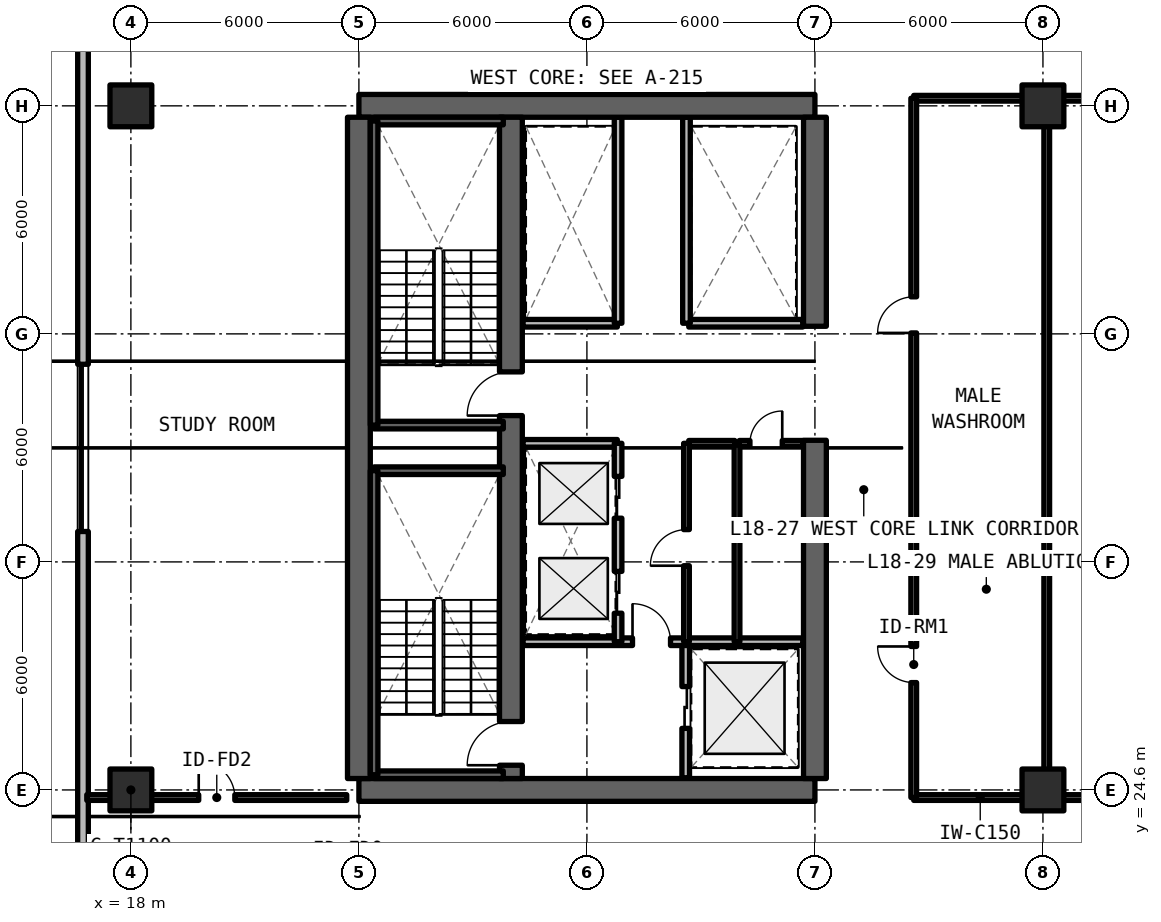
"""IFC4 building model, lengths in metres.
Left out: names, types, materials, properties, quantities, classifications, styles, units other than length and angle.
Written with IfcOpenShell. Run it as: python <this file> out.ifc"""

import sys

from ifc_helpers import new_model, si_unit, direction, frame, frame_2d, origin, origin_2d, place, context, subcontext, project, spatial, rectangle, extrude, element, fill, save


model = new_model("IFC4")
c1 = context("Model", 3, precision=1e-05, world=origin(), true_north=direction((0.0, 1.0)))
c2 = subcontext(c1, "Body", "Model", "MODEL_VIEW")
j1 = project(units=[si_unit("LENGTHUNIT", "METRE"), si_unit("PLANEANGLEUNIT", "RADIAN")], contexts=[c1])
p1 = place(None, origin())
s1 = spatial("IfcSite", under=j1, at=p1, CompositionType="ELEMENT")
p2 = place(p1, origin())
s2 = spatial("IfcBuilding", under=s1, at=p2, CompositionType="ELEMENT")
p3 = place(p2, frame((0.0, 0.0, 66.0)))
s3 = spatial("IfcBuildingStorey", under=s2, at=p3, CompositionType="ELEMENT", Elevation=66.0)
for number, where, z_axis, x_axis in (
    (1, (24.0, 24.6, 0.0), (0.0, 0.0, 1.0), (1.0, 0.0, 0.0)),
    (2, (36.0, 42.6, 0.0), (0.0, 0.0, 1.0), (-1.0, 0.0, 0.0)),
):
    element("IfcWall", number, at=place(p3, frame(where, z_axis=z_axis, x_axis=x_axis)), inside=s3, PredefinedType="SHEAR", context=c2, shape_type="SweptSolid", body=[
        extrude(rectangle(XDim=12.0, YDim=0.6, at=frame_2d((6.0, 0.0))), origin(), (0.0, 0.0, 1.0), 3.63),
    ])
p4 = place(p3, frame((24.0, 24.9, 0.0), z_axis=(0.0, 0.0, 1.0), x_axis=(0.0, 1.0, 0.0)))
e3 = element("IfcWall", 3, at=p4, inside=s3, PredefinedType="SHEAR", context=c2, shape_type="SweptSolid", body=[
    extrude(rectangle(XDim=17.4, YDim=0.6, at=frame_2d((8.7, 0.0))), origin(), (0.0, 0.0, 1.0), 3.63),
])
p5 = place(p3, frame((36.0, 24.9, 0.0), z_axis=(0.0, 0.0, 1.0), x_axis=(0.0, 1.0, 0.0)))
e4 = element("IfcWall", 4, at=p5, inside=s3, PredefinedType="SHEAR", context=c2, shape_type="SweptSolid", body=[
    extrude(rectangle(XDim=8.9, YDim=0.6, at=frame_2d((4.45, 0.0))), origin(), (0.0, 0.0, 1.0), 3.63),
])
p6 = place(p3, frame((36.0, 36.8, 0.0), z_axis=(0.0, 0.0, 1.0), x_axis=(0.0, 1.0, 0.0)))
e5 = element("IfcWall", 5, at=p6, inside=s3, PredefinedType="SHEAR", context=c2, shape_type="SweptSolid", body=[
    extrude(rectangle(XDim=5.5, YDim=0.6, at=frame_2d((2.75, 0.0))), origin(), (0.0, 0.0, 1.0), 3.63),
])
p7 = place(p3, frame((28.0, 24.9, 0.0), z_axis=(0.0, 0.0, 1.0), x_axis=(0.0, 1.0, 0.0)))
e6 = element("IfcWall", 6, at=p7, inside=s3, PredefinedType="SHEAR", context=c2, shape_type="SweptSolid", body=[
    extrude(rectangle(XDim=17.4, YDim=0.6, at=frame_2d((8.7, 0.0))), origin(), (0.0, 0.0, 1.0), 3.63),
])
p8 = place(p7, frame((0.35, 0.0, 0.0)))
e7 = element("IfcOpeningElement", 7, at=p8, cuts=e6, PredefinedType="OPENING", context=c2, shape_type="SweptSolid", body=[
    extrude(rectangle(XDim=1.15, YDim=2.15, at=frame_2d((0.575, 1.075))), frame((0.0, 0.31, 0.0), z_axis=(0.0, -1.0, 0.0), x_axis=(1.0, 0.0, 0.0)), (0.0, 0.0, 1.0), 0.62),
])
p9 = place(p7, frame((9.55, 0.0, 0.0)))
e8 = element("IfcOpeningElement", 8, at=p9, cuts=e6, PredefinedType="OPENING", context=c2, shape_type="SweptSolid", body=[
    extrude(rectangle(XDim=1.15, YDim=2.15, at=frame_2d((0.575, 1.075))), frame((0.0, 0.31, 0.0), z_axis=(0.0, -1.0, 0.0), x_axis=(1.0, 0.0, 0.0)), (0.0, 0.0, 1.0), 0.62),
])
for number, where, z_axis, x_axis in (
    (9, (18.0, 24.6, 0.0), (0.0, 0.0, 1.0), (1.0, 0.0, 0.0)),
    (10, (18.0, 42.6, 0.0), (0.0, 0.0, 1.0), (1.0, 0.0, 0.0)),
    (11, (42.0, 24.6, 0.0), (0.0, 0.0, 1.0), (1.0, 0.0, 0.0)),
    (12, (42.0, 42.6, 0.0), (0.0, 0.0, 1.0), (1.0, 0.0, 0.0)),
):
    element("IfcColumn", number, at=place(p3, frame(where, z_axis=z_axis, x_axis=x_axis)), inside=s3, PredefinedType="COLUMN", context=c2, shape_type="SweptSolid", body=[
        extrude(rectangle(XDim=1.1, YDim=1.1, at=origin_2d()), origin(), (0.0, 0.0, 1.0), 3.63),
    ])
p10 = place(p3, frame((16.74, 55.342, 0.0), z_axis=(0.0, 0.0, 1.0), x_axis=(0.0, -1.0, 0.0)))
e13 = element("IfcWall", 13, at=p10, inside=s3, PredefinedType="SOLIDWALL", context=c2, shape_type="SweptSolid", body=[
    extrude(rectangle(XDim=43.484, YDim=0.28, at=frame_2d((21.742, 0.0))), origin(), (0.0, 0.0, 1.0), 3.41),
])
p11 = place(p10, frame((38.942, 0.0, 0.0)))
e14 = element("IfcOpeningElement", 14, at=p11, cuts=e13, PredefinedType="OPENING", context=c2, shape_type="SweptSolid", body=[
    extrude(rectangle(XDim=1.1, YDim=2.15, at=frame_2d((0.55, 1.075))), frame((0.0, 0.15, 0.0), z_axis=(0.0, -1.0, 0.0), x_axis=(1.0, 0.0, 0.0)), (0.0, 0.0, 1.0), 0.3),
])
p12 = place(p10, frame((19.542, 0.0, 0.78)))
e15 = element("IfcOpeningElement", 15, at=p12, cuts=e13, PredefinedType="OPENING", context=c2, shape_type="SweptSolid", body=[
    extrude(rectangle(XDim=4.4, YDim=1.66, at=frame_2d((2.2, 0.83))), frame((0.0, 0.15, 0.0), z_axis=(0.0, -1.0, 0.0), x_axis=(1.0, 0.0, 0.0)), (0.0, 0.0, 1.0), 0.3),
])
p13 = place(p3, frame((32.6, 24.92, 0.0), z_axis=(0.0, 0.0, 1.0), x_axis=(0.0, 1.0, 0.0)))
e16 = element("IfcWall", 16, at=p13, inside=s3, PredefinedType="SOLIDWALL", context=c2, shape_type="SweptSolid", body=[
    extrude(rectangle(XDim=3.58, YDim=0.2, at=frame_2d((1.79, 0.0))), origin(), (0.0, 0.0, 1.0), 2.63),
])
p14 = place(p13, frame((1.3, 0.0, 0.0)))
e17 = element("IfcOpeningElement", 17, at=p14, cuts=e16, PredefinedType="OPENING", context=c2, shape_type="SweptSolid", body=[
    extrude(rectangle(XDim=1.1, YDim=2.2, at=frame_2d((0.55, 1.1))), frame((0.0, 0.11, 0.0), z_axis=(0.0, -1.0, 0.0), x_axis=(1.0, 0.0, 0.0)), (0.0, 0.0, 1.0), 0.22),
])
p15 = place(p3, frame((28.32, 28.5, 0.0), z_axis=(0.0, 0.0, 1.0), x_axis=(1.0, 0.0, 0.0)))
e18 = element("IfcWall", 18, at=p15, inside=s3, PredefinedType="SOLIDWALL", context=c2, shape_type="SweptSolid", body=[
    extrude(rectangle(XDim=7.36, YDim=0.2, at=frame_2d((3.68, 0.0))), origin(), (0.0, 0.0, 1.0), 2.63),
])
p16 = place(p15, frame((2.88, 0.0, 0.0)))
e19 = element("IfcOpeningElement", 19, at=p16, cuts=e18, PredefinedType="OPENING", context=c2, shape_type="SweptSolid", body=[
    extrude(rectangle(XDim=1.0, YDim=2.15, at=frame_2d((0.5, 1.075))), frame((0.0, 0.11, 0.0), z_axis=(0.0, -1.0, 0.0), x_axis=(1.0, 0.0, 0.0)), (0.0, 0.0, 1.0), 0.22),
])
p17 = place(p3, frame((28.32, 33.72, 0.0), z_axis=(0.0, 0.0, 1.0), x_axis=(1.0, 0.0, 0.0)))
e20 = element("IfcWall", 20, at=p17, inside=s3, PredefinedType="SOLIDWALL", context=c2, shape_type="SweptSolid", body=[
    extrude(rectangle(XDim=2.48, YDim=0.2, at=frame_2d((1.24, 0.0))), origin(), (0.0, 0.0, 1.0), 2.63),
])
p18 = place(p3, frame((30.82, 28.5, 0.0), z_axis=(0.0, 0.0, 1.0), x_axis=(0.0, 1.0, 0.0)))
e21 = element("IfcWall", 21, at=p18, inside=s3, PredefinedType="SOLIDWALL", context=c2, shape_type="SweptSolid", body=[
    extrude(rectangle(XDim=5.22, YDim=0.2, at=frame_2d((2.61, 0.0))), origin(), (0.0, 0.0, 1.0), 2.63),
])
p19 = place(p18, frame((0.75, 0.0, 0.0)))
e22 = element("IfcOpeningElement", 22, at=p19, cuts=e21, PredefinedType="OPENING", context=c2, shape_type="SweptSolid", body=[
    extrude(rectangle(XDim=1.1, YDim=2.2, at=frame_2d((0.55, 1.1))), frame((0.0, 0.11, 0.0), z_axis=(0.0, -1.0, 0.0), x_axis=(1.0, 0.0, 0.0)), (0.0, 0.0, 1.0), 0.22),
])
p20 = place(p18, frame((3.25, 0.0, 0.0)))
e23 = element("IfcOpeningElement", 23, at=p20, cuts=e21, PredefinedType="OPENING", context=c2, shape_type="SweptSolid", body=[
    extrude(rectangle(XDim=1.1, YDim=2.2, at=frame_2d((0.55, 1.1))), frame((0.0, 0.11, 0.0), z_axis=(0.0, -1.0, 0.0), x_axis=(1.0, 0.0, 0.0)), (0.0, 0.0, 1.0), 0.22),
])
p21 = place(p3, frame((33.95, 28.5, 0.0), z_axis=(0.0, 0.0, 1.0), x_axis=(0.0, 1.0, 0.0)))
e24 = element("IfcWall", 24, at=p21, inside=s3, PredefinedType="SOLIDWALL", context=c2, shape_type="SweptSolid", body=[
    extrude(rectangle(XDim=5.22, YDim=0.15, at=frame_2d((2.61, 0.0))), origin(), (0.0, 0.0, 1.0), 2.63),
])
p22 = place(p3, frame((32.68, 33.72, 0.0), z_axis=(0.0, 0.0, 1.0), x_axis=(1.0, 0.0, 0.0)))
e25 = element("IfcWall", 25, at=p22, inside=s3, PredefinedType="SOLIDWALL", context=c2, shape_type="SweptSolid", body=[
    extrude(rectangle(XDim=1.21, YDim=0.15, at=frame_2d((0.605, 0.0))), origin(), (0.0, 0.0, 1.0), 2.63),
])
p23 = place(p3, frame((34.01, 33.72, 0.0), z_axis=(0.0, 0.0, 1.0), x_axis=(1.0, 0.0, 0.0)))
e26 = element("IfcWall", 26, at=p23, inside=s3, PredefinedType="SOLIDWALL", context=c2, shape_type="SweptSolid", body=[
    extrude(rectangle(XDim=1.67, YDim=0.15, at=frame_2d((0.835, 0.0))), origin(), (0.0, 0.0, 1.0), 2.63),
])
p24 = place(p23, frame((0.28, 0.0, 0.0)))
e27 = element("IfcOpeningElement", 27, at=p24, cuts=e26, PredefinedType="OPENING", context=c2, shape_type="SweptSolid", body=[
    extrude(rectangle(XDim=0.85, YDim=2.1, at=frame_2d((0.425, 1.05))), frame((0.0, 0.085, 0.0), z_axis=(0.0, -1.0, 0.0), x_axis=(1.0, 0.0, 0.0)), (0.0, 0.0, 1.0), 0.17),
])
p25 = place(p3, frame((32.62, 28.5, 0.0), z_axis=(0.0, 0.0, 1.0), x_axis=(0.0, 1.0, 0.0)))
e28 = element("IfcWall", 28, at=p25, inside=s3, PredefinedType="SOLIDWALL", context=c2, shape_type="SweptSolid", body=[
    extrude(rectangle(XDim=5.22, YDim=0.15, at=frame_2d((2.61, 0.0))), origin(), (0.0, 0.0, 1.0), 2.63),
])
p26 = place(p25, frame((2.0, 0.0, 0.0)))
e29 = element("IfcOpeningElement", 29, at=p26, cuts=e28, PredefinedType="OPENING", context=c2, shape_type="SweptSolid", body=[
    extrude(rectangle(XDim=0.95, YDim=2.15, at=frame_2d((0.475, 1.075))), frame((0.0, 0.085, 0.0), z_axis=(0.0, -1.0, 0.0), x_axis=(1.0, 0.0, 0.0)), (0.0, 0.0, 1.0), 0.17),
])
p27 = place(p3, frame((28.32, 36.88, 0.0), z_axis=(0.0, 0.0, 1.0), x_axis=(1.0, 0.0, 0.0)))
e30 = element("IfcWall", 30, at=p27, inside=s3, PredefinedType="SOLIDWALL", context=c2, shape_type="SweptSolid", body=[
    extrude(rectangle(XDim=2.48, YDim=0.2, at=frame_2d((1.24, 0.0))), origin(), (0.0, 0.0, 1.0), 2.63),
])
p28 = place(p3, frame((30.82, 36.88, 0.0), z_axis=(0.0, 0.0, 1.0), x_axis=(0.0, 1.0, 0.0)))
e31 = element("IfcWall", 31, at=p28, inside=s3, PredefinedType="SOLIDWALL", context=c2, shape_type="SweptSolid", body=[
    extrude(rectangle(XDim=5.42, YDim=0.2, at=frame_2d((2.71, 0.0))), origin(), (0.0, 0.0, 1.0), 2.63),
])
p29 = place(p3, frame((32.68, 36.88, 0.0), z_axis=(0.0, 0.0, 1.0), x_axis=(1.0, 0.0, 0.0)))
e32 = element("IfcWall", 32, at=p29, inside=s3, PredefinedType="SOLIDWALL", context=c2, shape_type="SweptSolid", body=[
    extrude(rectangle(XDim=3.0, YDim=0.2, at=frame_2d((1.5, 0.0))), origin(), (0.0, 0.0, 1.0), 2.63),
])
p30 = place(p3, frame((32.62, 36.88, 0.0), z_axis=(0.0, 0.0, 1.0), x_axis=(0.0, 1.0, 0.0)))
e33 = element("IfcWall", 33, at=p30, inside=s3, PredefinedType="SOLIDWALL", context=c2, shape_type="SweptSolid", body=[
    extrude(rectangle(XDim=5.42, YDim=0.2, at=frame_2d((2.71, 0.0))), origin(), (0.0, 0.0, 1.0), 2.63),
])
p31 = place(p3, frame((38.6, 24.4, 0.0), z_axis=(0.0, 0.0, 1.0), x_axis=(1.0, 0.0, 0.0)))
e34 = element("IfcWall", 34, at=p31, inside=s3, PredefinedType="SOLIDWALL", context=c2, shape_type="SweptSolid", body=[
    extrude(rectangle(XDim=3.5, YDim=0.15, at=frame_2d((1.75, 0.0))), origin(), (0.0, 0.0, 1.0), 2.625),
])
p32 = place(p3, frame((38.6, 31.4, 0.0), z_axis=(0.0, 0.0, 1.0), x_axis=(1.0, 0.0, 0.0)))
e35 = element("IfcWall", 35, at=p32, inside=s3, PredefinedType="SOLIDWALL", context=c2, shape_type="SweptSolid", body=[
    extrude(rectangle(XDim=3.5, YDim=0.15, at=frame_2d((1.75, 0.0))), origin(), (0.0, 0.0, 1.0), 2.63),
])
p33 = place(p3, frame((38.6, 24.4, 0.0), z_axis=(0.0, 0.0, 1.0), x_axis=(0.0, 1.0, 0.0)))
e36 = element("IfcWall", 36, at=p33, inside=s3, PredefinedType="SOLIDWALL", context=c2, shape_type="SweptSolid", body=[
    extrude(rectangle(XDim=7.0, YDim=0.15, at=frame_2d((3.5, 0.0))), origin(), (0.0, 0.0, 1.0), 2.63),
])
p34 = place(p33, frame((3.025, 0.0, 0.0)))
e37 = element("IfcOpeningElement", 37, at=p34, cuts=e36, PredefinedType="OPENING", context=c2, shape_type="SweptSolid", body=[
    extrude(rectangle(XDim=0.95, YDim=2.15, at=frame_2d((0.475, 1.075))), frame((0.0, 0.085, 0.0), z_axis=(0.0, -1.0, 0.0), x_axis=(1.0, 0.0, 0.0)), (0.0, 0.0, 1.0), 0.17),
])
p35 = place(p3, frame((38.6, 42.8, 0.0), z_axis=(0.0, 0.0, 1.0), x_axis=(1.0, 0.0, 0.0)))
e38 = element("IfcWall", 38, at=p35, inside=s3, PredefinedType="SOLIDWALL", context=c2, shape_type="SweptSolid", body=[
    extrude(rectangle(XDim=3.5, YDim=0.15, at=frame_2d((1.75, 0.0))), origin(), (0.0, 0.0, 1.0), 2.625),
])
p36 = place(p3, frame((38.6, 31.4, 0.0), z_axis=(0.0, 0.0, 1.0), x_axis=(0.0, 1.0, 0.0)))
e39 = element("IfcWall", 39, at=p36, inside=s3, PredefinedType="SOLIDWALL", context=c2, shape_type="SweptSolid", body=[
    extrude(rectangle(XDim=11.4, YDim=0.15, at=frame_2d((5.7, 0.0))), origin(), (0.0, 0.0, 1.0), 2.63),
])
p37 = place(p36, frame((5.225, 0.0, 0.0)))
e40 = element("IfcOpeningElement", 40, at=p37, cuts=e39, PredefinedType="OPENING", context=c2, shape_type="SweptSolid", body=[
    extrude(rectangle(XDim=0.95, YDim=2.15, at=frame_2d((0.475, 1.075))), frame((0.0, 0.085, 0.0), z_axis=(0.0, -1.0, 0.0), x_axis=(1.0, 0.0, 0.0)), (0.0, 0.0, 1.0), 0.17),
])
p38 = place(p3, frame((42.1, 24.4, 0.0), z_axis=(0.0, 0.0, 1.0), x_axis=(1.0, 0.0, 0.0)))
e41 = element("IfcWall", 41, at=p38, inside=s3, PredefinedType="SOLIDWALL", context=c2, shape_type="SweptSolid", body=[
    extrude(rectangle(XDim=29.0, YDim=0.15, at=frame_2d((14.5, 0.0))), origin(), (0.0, 0.0, 1.0), 2.625),
])
p39 = place(p38, frame((13.8, 0.0, 0.0)))
e42 = element("IfcOpeningElement", 42, at=p39, cuts=e41, PredefinedType="OPENING", context=c2, shape_type="SweptSolid", body=[
    extrude(rectangle(XDim=1.4, YDim=2.15, at=frame_2d((0.7, 1.075))), frame((0.0, 0.085, 0.0), z_axis=(0.0, -1.0, 0.0), x_axis=(1.0, 0.0, 0.0)), (0.0, 0.0, 1.0), 0.17),
])
p40 = place(p3, frame((42.1, 42.8, 0.0), z_axis=(0.0, 0.0, 1.0), x_axis=(1.0, 0.0, 0.0)))
e43 = element("IfcWall", 43, at=p40, inside=s3, PredefinedType="SOLIDWALL", context=c2, shape_type="SweptSolid", body=[
    extrude(rectangle(XDim=29.0, YDim=0.15, at=frame_2d((14.5, 0.0))), origin(), (0.0, 0.0, 1.0), 2.625),
])
p41 = place(p3, frame((42.1, 24.4, 0.0), z_axis=(0.0, 0.0, 1.0), x_axis=(0.0, 1.0, 0.0)))
e44 = element("IfcWall", 44, at=p41, inside=s3, PredefinedType="SOLIDWALL", context=c2, shape_type="SweptSolid", body=[
    extrude(rectangle(XDim=18.4, YDim=0.15, at=frame_2d((9.2, 0.0))), origin(), (0.0, 0.0, 1.0), 2.63),
])
p42 = place(p3, frame((16.84, 24.4, 0.0), z_axis=(0.0, 0.0, 1.0), x_axis=(1.0, 0.0, 0.0)))
e45 = element("IfcWall", 45, at=p42, inside=s3, PredefinedType="SOLIDWALL", context=c2, shape_type="SweptSolid", body=[
    extrude(rectangle(XDim=6.84, YDim=0.15, at=frame_2d((3.42, 0.0))), origin(), (0.0, 0.0, 1.0), 2.625),
])
p43 = place(p42, frame((2.945, 0.0, 0.0)))
e46 = element("IfcOpeningElement", 46, at=p43, cuts=e45, PredefinedType="OPENING", context=c2, shape_type="SweptSolid", body=[
    extrude(rectangle(XDim=0.95, YDim=2.15, at=frame_2d((0.475, 1.075))), frame((0.0, 0.085, 0.0), z_axis=(0.0, -1.0, 0.0), x_axis=(1.0, 0.0, 0.0)), (0.0, 0.0, 1.0), 0.17),
])
for number, where, z_axis, x_axis in (
    (47, (24.4, 25.0, 0.0), (0.0, 0.0, 1.0), (1.0, 0.0, 0.0)),
    (48, (27.8, 33.0, 0.0), (0.0, 0.0, 1.0), (-1.0, 0.0, 0.0)),
):
    element("IfcWall", number, at=place(p3, frame(where, z_axis=z_axis, x_axis=x_axis)), inside=s3, PredefinedType="SOLIDWALL", context=c2, shape_type="SweptSolid", body=[
        extrude(rectangle(XDim=3.4, YDim=0.2, at=frame_2d((1.7, 0.0))), origin(), (0.0, 0.0, 1.0), 3.63),
    ])
p44 = place(p3, frame((24.4, 33.0, 0.0), z_axis=(0.0, 0.0, 1.0), x_axis=(0.0, -1.0, 0.0)))
e49 = element("IfcWall", 49, at=p44, inside=s3, PredefinedType="SOLIDWALL", context=c2, shape_type="SweptSolid", body=[
    extrude(rectangle(XDim=8.0, YDim=0.2, at=frame_2d((4.0, 0.0))), origin(), (0.0, 0.0, 1.0), 3.63),
])
for number, where, z_axis, x_axis in (
    (50, (24.4, 34.2, 0.0), (0.0, 0.0, 1.0), (1.0, 0.0, 0.0)),
    (51, (27.8, 42.2, 0.0), (0.0, 0.0, 1.0), (-1.0, 0.0, 0.0)),
):
    element("IfcWall", number, at=place(p3, frame(where, z_axis=z_axis, x_axis=x_axis)), inside=s3, PredefinedType="SOLIDWALL", context=c2, shape_type="SweptSolid", body=[
        extrude(rectangle(XDim=3.4, YDim=0.2, at=frame_2d((1.7, 0.0))), origin(), (0.0, 0.0, 1.0), 3.63),
    ])
p45 = place(p3, frame((24.4, 42.2, 0.0), z_axis=(0.0, 0.0, 1.0), x_axis=(0.0, -1.0, 0.0)))
e52 = element("IfcWall", 52, at=p45, inside=s3, PredefinedType="SOLIDWALL", context=c2, shape_type="SweptSolid", body=[
    extrude(rectangle(XDim=8.0, YDim=0.2, at=frame_2d((4.0, 0.0))), origin(), (0.0, 0.0, 1.0), 3.63),
])
p46 = place(p12, origin())
e53 = element("IfcWindow", 53, at=p46, inside=s3, PartitioningType="SINGLE_PANEL", PredefinedType="WINDOW", context=c2, shape_type="SweptSolid", body=[
    extrude(rectangle(XDim=4.4, YDim=1.66, at=frame_2d((2.2, 0.83))), frame((0.0, 0.03, 0.0), z_axis=(0.0, -1.0, 0.0), x_axis=(1.0, 0.0, 0.0)), (0.0, 0.0, 1.0), 0.06),
])
fill(e15, e53)
p47 = place(p14, origin())
e54 = element("IfcDoor", 54, at=p47, inside=s3, OperationType="SLIDING_TO_LEFT", PredefinedType="DOOR", context=c2, shape_type="SweptSolid", body=[
    extrude(rectangle(XDim=1.1, YDim=2.2, at=frame_2d((0.55, 1.1))), frame((0.0, 0.025, 0.0), z_axis=(0.0, -1.0, 0.0), x_axis=(1.0, 0.0, 0.0)), (0.0, 0.0, 1.0), 0.05),
])
fill(e17, e54)
p48 = place(p16, origin())
e55 = element("IfcDoor", 55, at=p48, inside=s3, OperationType="SINGLE_SWING_LEFT", PredefinedType="DOOR", context=c2, shape_type="SweptSolid", body=[
    extrude(rectangle(XDim=1.0, YDim=2.15, at=frame_2d((0.5, 1.075))), frame((0.0, 0.025, 0.0), z_axis=(0.0, -1.0, 0.0), x_axis=(1.0, 0.0, 0.0)), (0.0, 0.0, 1.0), 0.05),
])
fill(e19, e55)
p49 = place(p19, origin())
e56 = element("IfcDoor", 56, at=p49, inside=s3, OperationType="SLIDING_TO_LEFT", PredefinedType="DOOR", context=c2, shape_type="SweptSolid", body=[
    extrude(rectangle(XDim=1.1, YDim=2.2, at=frame_2d((0.55, 1.1))), frame((0.0, 0.025, 0.0), z_axis=(0.0, -1.0, 0.0), x_axis=(1.0, 0.0, 0.0)), (0.0, 0.0, 1.0), 0.05),
])
fill(e22, e56)
p50 = place(p20, origin())
e57 = element("IfcDoor", 57, at=p50, inside=s3, OperationType="SLIDING_TO_RIGHT", PredefinedType="DOOR", context=c2, shape_type="SweptSolid", body=[
    extrude(rectangle(XDim=1.1, YDim=2.2, at=frame_2d((0.55, 1.1))), frame((0.0, 0.025, 0.0), z_axis=(0.0, -1.0, 0.0), x_axis=(1.0, 0.0, 0.0)), (0.0, 0.0, 1.0), 0.05),
])
fill(e23, e57)
p51 = place(p24, origin())
e58 = element("IfcDoor", 58, at=p51, inside=s3, OperationType="SINGLE_SWING_RIGHT", PredefinedType="DOOR", context=c2, shape_type="SweptSolid", body=[
    extrude(rectangle(XDim=0.85, YDim=2.1, at=frame_2d((0.425, 1.05))), frame((0.0, 0.025, 0.0), z_axis=(0.0, -1.0, 0.0), x_axis=(1.0, 0.0, 0.0)), (0.0, 0.0, 1.0), 0.05),
])
fill(e27, e58)
p52 = place(p26, origin())
e59 = element("IfcDoor", 59, at=p52, inside=s3, OperationType="SINGLE_SWING_LEFT", PredefinedType="DOOR", context=c2, shape_type="SweptSolid", body=[
    extrude(rectangle(XDim=0.95, YDim=2.15, at=frame_2d((0.475, 1.075))), frame((0.0, 0.025, 0.0), z_axis=(0.0, -1.0, 0.0), x_axis=(1.0, 0.0, 0.0)), (0.0, 0.0, 1.0), 0.05),
])
fill(e29, e59)
p53 = place(p34, origin())
e60 = element("IfcDoor", 60, at=p53, inside=s3, OperationType="SINGLE_SWING_RIGHT", PredefinedType="DOOR", context=c2, shape_type="SweptSolid", body=[
    extrude(rectangle(XDim=0.95, YDim=2.15, at=frame_2d((0.475, 1.075))), frame((0.0, 0.025, 0.0), z_axis=(0.0, -1.0, 0.0), x_axis=(1.0, 0.0, 0.0)), (0.0, 0.0, 1.0), 0.05),
])
fill(e37, e60)
p54 = place(p37, origin())
e61 = element("IfcDoor", 61, at=p54, inside=s3, OperationType="SINGLE_SWING_LEFT", PredefinedType="DOOR", context=c2, shape_type="SweptSolid", body=[
    extrude(rectangle(XDim=0.95, YDim=2.15, at=frame_2d((0.475, 1.075))), frame((0.0, 0.025, 0.0), z_axis=(0.0, -1.0, 0.0), x_axis=(1.0, 0.0, 0.0)), (0.0, 0.0, 1.0), 0.05),
])
fill(e40, e61)
p55 = place(p43, origin())
e62 = element("IfcDoor", 62, at=p55, inside=s3, OperationType="SINGLE_SWING_LEFT", PredefinedType="DOOR", context=c2, shape_type="SweptSolid", body=[
    extrude(rectangle(XDim=0.95, YDim=2.15, at=frame_2d((0.475, 1.075))), frame((0.0, 0.025, 0.0), z_axis=(0.0, -1.0, 0.0), x_axis=(1.0, 0.0, 0.0)), (0.0, 0.0, 1.0), 0.05),
])
fill(e46, e62)
p56 = place(p8, origin())
e63 = element("IfcDoor", 63, at=p56, inside=s3, OperationType="SINGLE_SWING_RIGHT", PredefinedType="DOOR", context=c2, shape_type="SweptSolid", body=[
    extrude(rectangle(XDim=1.15, YDim=2.15, at=frame_2d((0.575, 1.075))), frame((0.0, 0.025, 0.0), z_axis=(0.0, -1.0, 0.0), x_axis=(1.0, 0.0, 0.0)), (0.0, 0.0, 1.0), 0.05),
])
fill(e7, e63)
p57 = place(p9, origin())
e64 = element("IfcDoor", 64, at=p57, inside=s3, OperationType="SINGLE_SWING_LEFT", PredefinedType="DOOR", context=c2, shape_type="SweptSolid", body=[
    extrude(rectangle(XDim=1.15, YDim=2.15, at=frame_2d((0.575, 1.075))), frame((0.0, 0.025, 0.0), z_axis=(0.0, -1.0, 0.0), x_axis=(1.0, 0.0, 0.0)), (0.0, 0.0, 1.0), 0.05),
])
fill(e8, e64)
save(model, sys.argv[1])
